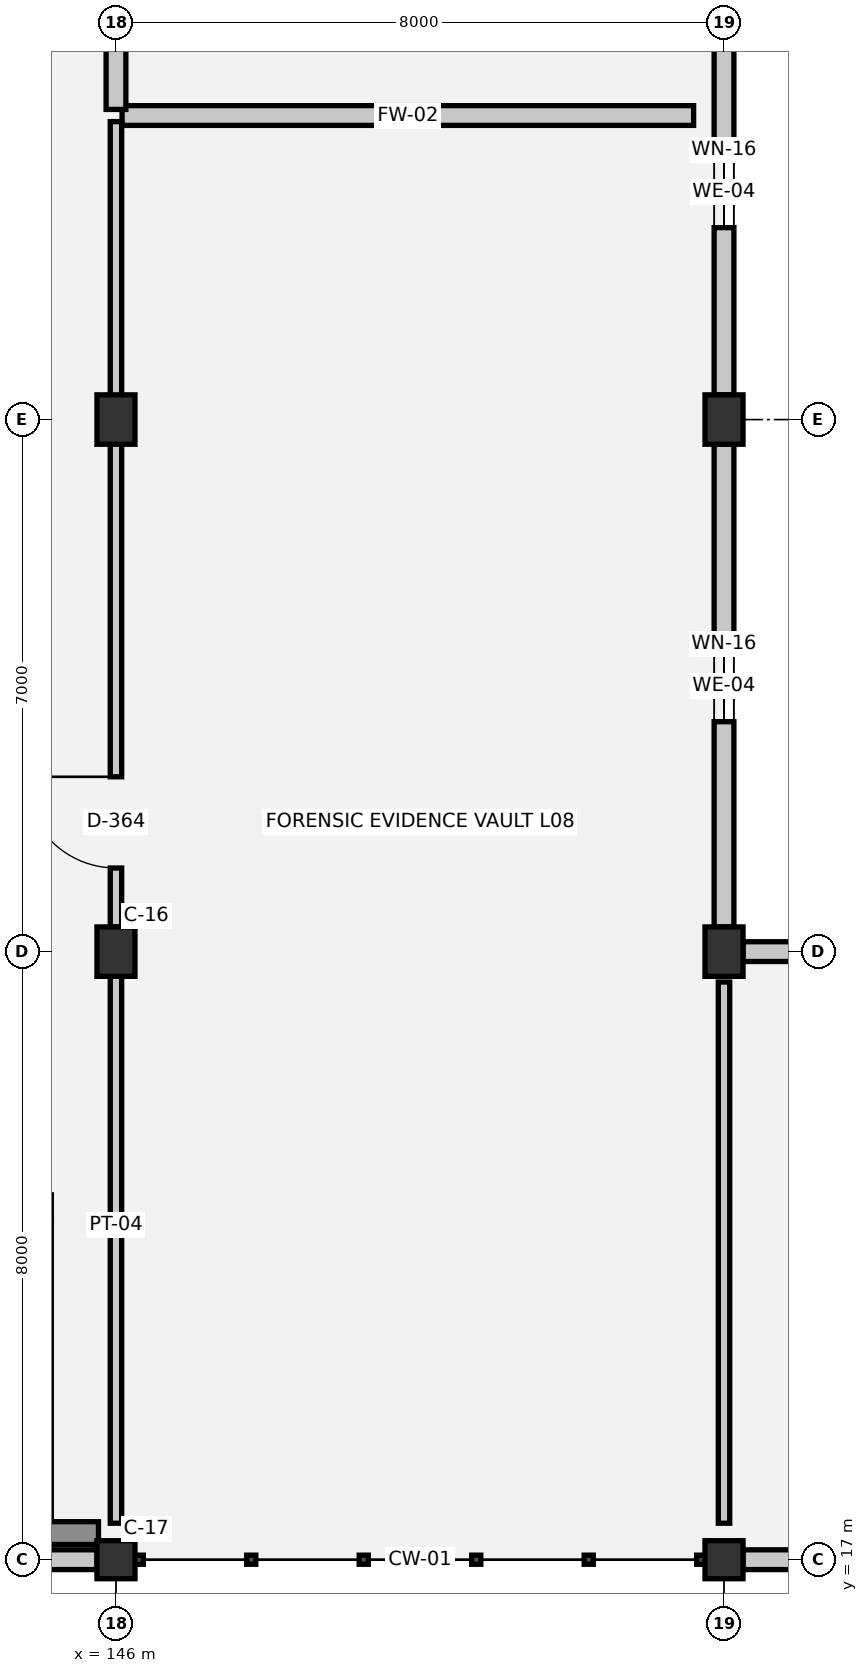
"""IFC4 building model, lengths in metres.
Left out: names, types, materials, properties, quantities, classifications, styles, units other than length and angle.
Written with IfcOpenShell. Run it as: python <this file> out.ifc"""

import sys

from ifc_helpers import new_model, si_unit, direction, frame, frame_2d, origin, origin_2d, place, context, subcontext, project, spatial, rectangle, extrude, element, fill, save


model = new_model("IFC4")
c1 = context("Model", 3, precision=1e-05, world=origin(), true_north=direction((0.0, 1.0)))
c2 = subcontext(c1, "Body", "Model", "MODEL_VIEW")
j1 = project(units=[si_unit("LENGTHUNIT", "METRE"), si_unit("PLANEANGLEUNIT", "RADIAN")], contexts=[c1])
p1 = place(None, origin())
s1 = spatial("IfcSite", under=j1, at=p1, CompositionType="ELEMENT")
p2 = place(p1, origin())
s2 = spatial("IfcBuilding", under=s1, at=p2, CompositionType="ELEMENT")
p3 = place(p2, frame((0.0, 0.0, 29.55)))
s3 = spatial("IfcBuildingStorey", under=s2, at=p3, CompositionType="ELEMENT", Elevation=29.55)
p4 = place(p3, frame((146.0, 17.0, 0.0), z_axis=(0.0, 0.0, 1.0), x_axis=(1.0, 0.0, 0.0)))
e1 = element("IfcColumn", 1, at=p4, inside=s3, PredefinedType="COLUMN", context=c2, shape_type="SweptSolid", body=[
    extrude(rectangle(XDim=0.5, YDim=0.5, at=origin_2d()), origin(), (0.0, 0.0, 1.0), 3.75),
])
for number, where, z_axis, x_axis in (
    (2, (146.0, 25.0, 0.0), (0.0, 0.0, 1.0), (1.0, 0.0, 0.0)),
    (3, (146.0, 32.0, 0.0), (0.0, 0.0, 1.0), (1.0, 0.0, 0.0)),
):
    element("IfcColumn", number, at=place(p3, frame(where, z_axis=z_axis, x_axis=x_axis)), inside=s3, PredefinedType="COLUMN", context=c2, shape_type="SweptSolid", body=[
        extrude(rectangle(XDim=0.5, YDim=0.65, at=origin_2d()), origin(), (0.0, 0.0, 1.0), 3.75),
    ])
p5 = place(p3, frame((154.0, 17.0, 0.0), z_axis=(0.0, 0.0, 1.0), x_axis=(1.0, 0.0, 0.0)))
e4 = element("IfcColumn", 4, at=p5, inside=s3, PredefinedType="COLUMN", context=c2, shape_type="SweptSolid", body=[
    extrude(rectangle(XDim=0.5, YDim=0.5, at=origin_2d()), origin(), (0.0, 0.0, 1.0), 3.75),
])
for number, where, z_axis, x_axis in (
    (5, (154.0, 25.0, 0.0), (0.0, 0.0, 1.0), (1.0, 0.0, 0.0)),
    (6, (154.0, 32.0, 0.0), (0.0, 0.0, 1.0), (1.0, 0.0, 0.0)),
):
    element("IfcColumn", number, at=place(p3, frame(where, z_axis=z_axis, x_axis=x_axis)), inside=s3, PredefinedType="COLUMN", context=c2, shape_type="SweptSolid", body=[
        extrude(rectangle(XDim=0.5, YDim=0.65, at=origin_2d()), origin(), (0.0, 0.0, 1.0), 3.75),
    ])
p6 = place(p3, frame((154.0, 37.675, 0.0), z_axis=(0.0, 0.0, 1.0), x_axis=(0.0, -1.0, 0.0)))
e7 = element("IfcWall", 7, at=p6, inside=s3, PredefinedType="SOLIDWALL", context=c2, shape_type="SweptSolid", body=[
    extrude(rectangle(XDim=5.35, YDim=0.26, at=frame_2d((2.675, 0.0))), origin(), (0.0, 0.0, 1.0), 2.51),
])
p7 = place(p6, frame((2.2, 0.0, 1.0)))
e8 = element("IfcOpeningElement", 8, at=p7, cuts=e7, PredefinedType="OPENING", context=c2, shape_type="SweptSolid", body=[
    extrude(rectangle(XDim=0.95, YDim=1.1, at=frame_2d((0.475, 0.55))), frame((0.0, 0.14, 0.0), z_axis=(0.0, -1.0, 0.0), x_axis=(1.0, 0.0, 0.0)), (0.0, 0.0, 1.0), 0.28),
])
p8 = place(p3, frame((154.0, 31.675, 0.0), z_axis=(0.0, 0.0, 1.0), x_axis=(0.0, -1.0, 0.0)))
e9 = element("IfcWall", 9, at=p8, inside=s3, PredefinedType="SOLIDWALL", context=c2, shape_type="SweptSolid", body=[
    extrude(rectangle(XDim=6.35, YDim=0.26, at=frame_2d((3.175, 0.0))), origin(), (0.0, 0.0, 1.0), 2.51),
])
p9 = place(p8, frame((2.7, 0.0, 1.0)))
e10 = element("IfcOpeningElement", 10, at=p9, cuts=e9, PredefinedType="OPENING", context=c2, shape_type="SweptSolid", body=[
    extrude(rectangle(XDim=0.95, YDim=1.1, at=frame_2d((0.475, 0.55))), frame((0.0, 0.14, 0.0), z_axis=(0.0, -1.0, 0.0), x_axis=(1.0, 0.0, 0.0)), (0.0, 0.0, 1.0), 0.28),
])
p10 = place(p3, frame((154.25, 25.0, 0.0), z_axis=(0.0, 0.0, 1.0), x_axis=(1.0, 0.0, 0.0)))
e11 = element("IfcWall", 11, at=p10, inside=s3, PredefinedType="SOLIDWALL", context=c2, shape_type="SweptSolid", body=[
    extrude(rectangle(XDim=7.5, YDim=0.26, at=frame_2d((3.75, 0.0))), origin(), (0.0, 0.0, 1.0), 2.51),
])
p11 = place(p10, frame((2.65, 0.0, 0.9)))
e12 = element("IfcOpeningElement", 12, at=p11, cuts=e11, PredefinedType="OPENING", context=c2, shape_type="SweptSolid", body=[
    extrude(rectangle(XDim=2.2, YDim=1.0, at=frame_2d((1.1, 0.5))), frame((0.0, 0.14, 0.0), z_axis=(0.0, -1.0, 0.0), x_axis=(1.0, 0.0, 0.0)), (0.0, 0.0, 1.0), 0.28),
])
p12 = place(p3, frame((161.75, 17.0, 0.0), z_axis=(0.0, 0.0, 1.0), x_axis=(-1.0, 0.0, 0.0)))
e13 = element("IfcWall", 13, at=p12, inside=s3, PredefinedType="SOLIDWALL", context=c2, shape_type="SweptSolid", body=[
    extrude(rectangle(XDim=7.5, YDim=0.26, at=frame_2d((3.75, 0.0))), origin(), (0.0, 0.0, 1.0), 2.51),
])
p13 = place(p12, frame((2.65, 0.0, 0.9)))
e14 = element("IfcOpeningElement", 14, at=p13, cuts=e13, PredefinedType="OPENING", context=c2, shape_type="SweptSolid", body=[
    extrude(rectangle(XDim=2.2, YDim=1.0, at=frame_2d((1.1, 0.5))), frame((0.0, 0.14, 0.0), z_axis=(0.0, -1.0, 0.0), x_axis=(1.0, 0.0, 0.0)), (0.0, 0.0, 1.0), 0.28),
])
p14 = place(p3, frame((145.75, 17.0, 0.0), z_axis=(0.0, 0.0, 1.0), x_axis=(-1.0, 0.0, 0.0)))
e15 = element("IfcWall", 15, at=p14, inside=s3, PredefinedType="SOLIDWALL", context=c2, shape_type="SweptSolid", body=[
    extrude(rectangle(XDim=7.5, YDim=0.26, at=frame_2d((3.75, 0.0))), origin(), (0.0, 0.0, 1.0), 2.51),
])
p15 = place(p3, frame((137.45, 17.35, 0.0), z_axis=(0.0, 0.0, 1.0), x_axis=(1.0, 0.0, 0.0)))
e16 = element("IfcWall", 16, at=p15, inside=s3, PredefinedType="SHEAR", context=c2, shape_type="SweptSolid", body=[
    extrude(rectangle(XDim=8.32, YDim=0.3, at=frame_2d((4.16, 0.0))), origin(), (0.0, 0.0, 1.0), 3.47),
])
p16 = place(p3, frame((146.08, 36.0, 0.0), z_axis=(0.0, 0.0, 1.0), x_axis=(1.0, 0.0, 0.0)))
e17 = element("IfcWall", 17, at=p16, inside=s3, PredefinedType="SOLIDWALL", context=c2, shape_type="SweptSolid", body=[
    extrude(rectangle(XDim=7.52, YDim=0.26, at=frame_2d((3.76, 0.0))), origin(), (0.0, 0.0, 1.0), 3.39),
])
p17 = place(p3, frame((146.0, 17.48, 0.0), z_axis=(0.0, 0.0, 1.0), x_axis=(0.0, 1.0, 0.0)))
e18 = element("IfcWall", 18, at=p17, inside=s3, PredefinedType="PARTITIONING", context=c2, shape_type="SweptSolid", body=[
    extrude(rectangle(XDim=7.845, YDim=0.15, at=frame_2d((3.922, 0.0))), origin(), (0.0, 0.0, 1.0), 2.53),
])
p18 = place(p3, frame((146.0, 25.325, 0.0), z_axis=(0.0, 0.0, 1.0), x_axis=(0.0, 1.0, 0.0)))
e19 = element("IfcWall", 19, at=p18, inside=s3, PredefinedType="PARTITIONING", context=c2, shape_type="SweptSolid", body=[
    extrude(rectangle(XDim=10.595, YDim=0.15, at=frame_2d((5.297, 0.0))), origin(), (0.0, 0.0, 1.0), 2.93),
])
p19 = place(p18, frame((0.775, 0.0, 0.0)))
e20 = element("IfcOpeningElement", 20, at=p19, cuts=e19, PredefinedType="OPENING", context=c2, shape_type="SweptSolid", body=[
    extrude(rectangle(XDim=1.2, YDim=2.15, at=frame_2d((0.6, 1.075))), frame((0.0, 0.085, 0.0), z_axis=(0.0, -1.0, 0.0), x_axis=(1.0, 0.0, 0.0)), (0.0, 0.0, 1.0), 0.17),
])
p20 = place(p3, frame((146.0, 36.08, 0.0), z_axis=(0.0, 0.0, 1.0), x_axis=(0.0, 1.0, 0.0)))
e21 = element("IfcWall", 21, at=p20, inside=s3, PredefinedType="SOLIDWALL", context=c2, shape_type="SweptSolid", body=[
    extrude(rectangle(XDim=7.84, YDim=0.26, at=frame_2d((3.92, 0.0))), origin(), (0.0, 0.0, 1.0), 2.93),
])
p21 = place(p20, frame((3.38, 0.0, 0.0)))
e22 = element("IfcOpeningElement", 22, at=p21, cuts=e21, PredefinedType="OPENING", context=c2, shape_type="SweptSolid", body=[
    extrude(rectangle(XDim=1.08, YDim=2.1, at=frame_2d((0.54, 1.05))), frame((0.0, 0.14, 0.0), z_axis=(0.0, -1.0, 0.0), x_axis=(1.0, 0.0, 0.0)), (0.0, 0.0, 1.0), 0.28),
])
p22 = place(p3, frame((154.0, 17.48, 0.0), z_axis=(0.0, 0.0, 1.0), x_axis=(0.0, 1.0, 0.0)))
e23 = element("IfcWall", 23, at=p22, inside=s3, PredefinedType="PARTITIONING", context=c2, shape_type="SweptSolid", body=[
    extrude(rectangle(XDim=7.12, YDim=0.15, at=frame_2d((3.56, 0.0))), origin(), (0.0, 0.0, 1.0), 2.53),
])
p23 = place(p7, origin())
e24 = element("IfcWindow", 24, at=p23, inside=s3, PartitioningType="SINGLE_PANEL", PredefinedType="WINDOW", context=c2, shape_type="SweptSolid", body=[
    extrude(rectangle(XDim=0.95, YDim=1.1, at=frame_2d((0.475, 0.55))), frame((0.0, 0.03, 0.0), z_axis=(0.0, -1.0, 0.0), x_axis=(1.0, 0.0, 0.0)), (0.0, 0.0, 1.0), 0.06),
])
fill(e8, e24)
p24 = place(p9, origin())
e25 = element("IfcWindow", 25, at=p24, inside=s3, PartitioningType="SINGLE_PANEL", PredefinedType="WINDOW", context=c2, shape_type="SweptSolid", body=[
    extrude(rectangle(XDim=0.95, YDim=1.1, at=frame_2d((0.475, 0.55))), frame((0.0, 0.03, 0.0), z_axis=(0.0, -1.0, 0.0), x_axis=(1.0, 0.0, 0.0)), (0.0, 0.0, 1.0), 0.06),
])
fill(e10, e25)
p25 = place(p19, origin())
e26 = element("IfcDoor", 26, at=p25, inside=s3, OperationType="SINGLE_SWING_RIGHT", PredefinedType="DOOR", context=c2, shape_type="SweptSolid", body=[
    extrude(rectangle(XDim=1.2, YDim=2.15, at=frame_2d((0.6, 1.075))), frame((0.0, 0.025, 0.0), z_axis=(0.0, -1.0, 0.0), x_axis=(1.0, 0.0, 0.0)), (0.0, 0.0, 1.0), 0.05),
])
fill(e20, e26)
save(model, sys.argv[1])
